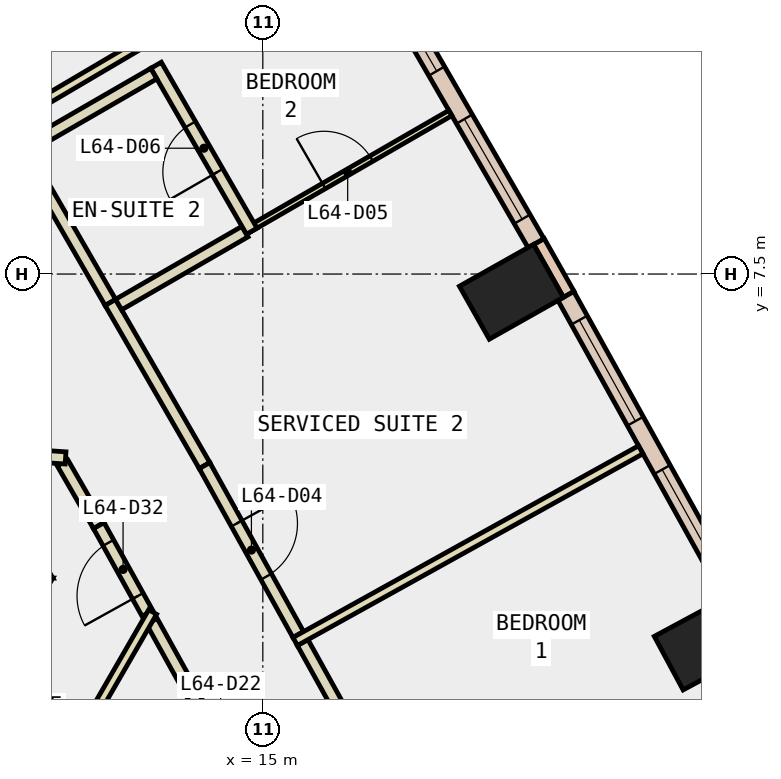
"""IFC4 building model, lengths in metres.
Left out: names, types, materials, properties, quantities, classifications, styles, units other than length and angle.
Written with IfcOpenShell. Run it as: python <this file> out.ifc"""

import sys

from ifc_helpers import new_model, si_unit, direction, frame, frame_2d, origin, origin_2d, place, context, subcontext, project, spatial, polyline, rectangle, outline, extrude, element, fill, save


model = new_model("IFC4")
c1 = context("Model", 3, precision=1e-05, world=origin(), true_north=direction((0.0, 1.0)))
c2 = subcontext(c1, "Body", "Model", "MODEL_VIEW")
j1 = project(units=[si_unit("LENGTHUNIT", "METRE"), si_unit("PLANEANGLEUNIT", "RADIAN")], contexts=[c1])
p1 = place(None, origin())
s1 = spatial("IfcSite", under=j1, at=p1, CompositionType="ELEMENT")
p2 = place(p1, origin())
s2 = spatial("IfcBuilding", under=s1, at=p2, CompositionType="ELEMENT")
p3 = place(p2, frame((0.0, 0.0, 277.4)))
s3 = spatial("IfcBuildingStorey", under=s2, at=p3, CompositionType="ELEMENT", Elevation=277.4)
for number, where, z_axis, x_axis in (
    (1, (22.292, 1.433, -0.34), (0.0, 0.0, 1.0), (-0.474, 0.881, 0.0)),
    (2, (19.089, 7.208, -0.34), (0.0, 0.0, 1.0), (-0.491, 0.871, 0.0)),
):
    element("IfcColumn", number, at=place(p3, frame(where, z_axis=z_axis, x_axis=x_axis)), inside=s3, PredefinedType="COLUMN", context=c2, shape_type="SweptSolid", body=[
        extrude(rectangle(XDim=1.0, YDim=1.4, at=origin_2d()), origin(), (0.0, 0.0, 1.0), 3.34),
    ])
p4 = place(p3, frame((0.0, 0.0, -0.34)))
e3 = element("IfcWall", 3, at=p4, inside=s3, PredefinedType="SHEAR", context=c2, shape_type="SweptSolid", body=[
    extrude(outline(polyline([(6.786, 10.747), (5.833, 10.197), (10.277, 2.5), (11.547, 2.5), (6.786, 10.747)])), origin(), (0.0, 0.0, 1.0), 3.34),
])
p5 = place(p3, frame((0.0, 0.0, -0.34)))
e4 = element("IfcWall", 4, at=p5, inside=s3, PredefinedType="SHEAR", context=c2, shape_type="SweptSolid", body=[
    extrude(outline(polyline([(5.774, -7.5), (11.547, 2.5), (10.277, 2.5), (5.138, -6.4), (5.774, -7.5)])), origin(), (0.0, 0.0, 1.0), 3.34),
])
p6 = place(p3, frame((20.032, 7.165, 0.0), z_axis=(0.0, 0.0, 1.0), x_axis=(-0.491848119507, 0.870681013539, 0.0)))
e5 = element("IfcWall", 5, at=p6, inside=s3, PredefinedType="STANDARD", context=c2, shape_type="SweptSolid", body=[
    extrude(rectangle(XDim=1.0, YDim=0.2, at=frame_2d((0.5, 0.0))), origin(), (0.0, 0.0, 1.0), 3.0),
])
p7 = place(p3, frame((22.71, 2.225, 0.0), z_axis=(0.0, 0.0, 1.0), x_axis=(-0.485049005017, 0.874486971162, 0.0)))
e6 = element("IfcWall", 6, at=p7, inside=s3, PredefinedType="STANDARD", context=c2, shape_type="SweptSolid", body=[
    extrude(rectangle(XDim=5.62, YDim=0.3, at=frame_2d((2.81, 0.0))), origin(), (0.0, 0.0, 1.0), 3.0),
])
p8 = place(p7, frame((0.455, 0.0, 0.9)))
e7 = element("IfcOpeningElement", 7, at=p8, cuts=e6, PredefinedType="OPENING", context=c2, shape_type="SweptSolid", body=[
    extrude(rectangle(XDim=1.9, YDim=2.0, at=frame_2d((0.95, 1.0))), frame((0.0, 0.16, 0.0), z_axis=(0.0, -1.0, 0.0), x_axis=(1.0, 0.0, 0.0)), (0.0, 0.0, 1.0), 0.32),
])
p9 = place(p7, frame((3.265, 0.0, 0.9)))
e8 = element("IfcOpeningElement", 8, at=p9, cuts=e6, PredefinedType="OPENING", context=c2, shape_type="SweptSolid", body=[
    extrude(rectangle(XDim=1.9, YDim=2.0, at=frame_2d((0.95, 1.0))), frame((0.0, 0.16, 0.0), z_axis=(0.0, -1.0, 0.0), x_axis=(1.0, 0.0, 0.0)), (0.0, 0.0, 1.0), 0.32),
])
p10 = place(p3, frame((19.493, 8.008, 0.0), z_axis=(0.0, 0.0, 1.0), x_axis=(-0.49999685976, 0.866027216796, 0.0)))
e9 = element("IfcWall", 9, at=p10, inside=s3, PredefinedType="STANDARD", context=c2, shape_type="SweptSolid", body=[
    extrude(rectangle(XDim=5.622, YDim=0.3, at=frame_2d((2.811, 0.0))), origin(), (0.0, 0.0, 1.0), 3.0),
])
p11 = place(p10, frame((0.456, 0.0, 0.9)))
e10 = element("IfcOpeningElement", 10, at=p11, cuts=e9, PredefinedType="OPENING", context=c2, shape_type="SweptSolid", body=[
    extrude(rectangle(XDim=1.9, YDim=2.0, at=frame_2d((0.95, 1.0))), frame((0.0, 0.16, 0.0), z_axis=(0.0, -1.0, 0.0), x_axis=(1.0, 0.0, 0.0)), (0.0, 0.0, 1.0), 0.32),
])
p12 = place(p10, frame((3.267, 0.0, 0.9)))
e11 = element("IfcOpeningElement", 11, at=p12, cuts=e9, PredefinedType="OPENING", context=c2, shape_type="SweptSolid", body=[
    extrude(rectangle(XDim=1.9, YDim=2.0, at=frame_2d((0.95, 1.0))), frame((0.0, 0.16, 0.0), z_axis=(0.0, -1.0, 0.0), x_axis=(1.0, 0.0, 0.0)), (0.0, 0.0, 1.0), 0.32),
])
p13 = place(p3, frame((13.102, 1.921, 0.0), z_axis=(0.0, 0.0, 1.0), x_axis=(-0.485065409582, 0.874477871891, 0.0)))
e12 = element("IfcWall", 12, at=p13, inside=s3, PredefinedType="PARTITIONING", context=c2, shape_type="SweptSolid", body=[
    extrude(rectangle(XDim=1.651, YDim=0.2, at=frame_2d((0.826, 0.0))), origin(), (0.0, 0.0, 1.0), 3.0),
])
p14 = place(p13, frame((0.325, 0.0, 0.0)))
e13 = element("IfcOpeningElement", 13, at=p14, cuts=e12, PredefinedType="OPENING", context=c2, shape_type="SweptSolid", body=[
    extrude(rectangle(XDim=1.0, YDim=2.1, at=frame_2d((0.5, 1.05))), frame((0.0, 0.11, 0.0), z_axis=(0.0, -1.0, 0.0), x_axis=(1.0, 0.0, 0.0)), (0.0, 0.0, 1.0), 0.22),
])
p15 = place(p3, frame((12.301, 3.365, 0.0), z_axis=(0.0, 0.0, 1.0), x_axis=(-0.499823064078, 0.86612753369, 0.0)))
e14 = element("IfcWall", 14, at=p15, inside=s3, PredefinedType="PARTITIONING", context=c2, shape_type="SweptSolid", body=[
    extrude(rectangle(XDim=1.19, YDim=0.2, at=frame_2d((0.595, 0.0))), origin(), (0.0, 0.0, 1.0), 3.0),
])
p16 = place(p3, frame((11.756, 4.476, 0.0), z_axis=(0.0, 0.0, 1.0), x_axis=(-0.99772020739, 0.067486204256, 0.0)))
e15 = element("IfcWall", 15, at=p16, inside=s3, PredefinedType="PARTITIONING", context=c2, shape_type="SweptSolid", body=[
    extrude(rectangle(XDim=1.407, YDim=0.2, at=frame_2d((0.704, 0.0))), origin(), (0.0, 0.0, 1.0), 3.0),
])
p17 = place(p3, frame((15.439, -2.293, 0.0), z_axis=(0.0, 0.0, 1.0), x_axis=(-0.485079003918, 0.874470331091, 0.0)))
e16 = element("IfcWall", 16, at=p17, inside=s3, PredefinedType="PARTITIONING", context=c2, shape_type="SweptSolid", body=[
    extrude(rectangle(XDim=4.669, YDim=0.2, at=frame_2d((2.334, 0.0))), origin(), (0.0, 0.0, 1.0), 3.0),
])
p18 = place(p17, frame((1.834, 0.0, 0.0)))
e17 = element("IfcOpeningElement", 17, at=p18, cuts=e16, PredefinedType="OPENING", context=c2, shape_type="SweptSolid", body=[
    extrude(rectangle(XDim=1.0, YDim=2.1, at=frame_2d((0.5, 1.05))), frame((0.0, 0.11, 0.0), z_axis=(0.0, -1.0, 0.0), x_axis=(1.0, 0.0, 0.0)), (0.0, 0.0, 1.0), 0.22),
])
p19 = place(p3, frame((15.655, 1.44, 0.0), z_axis=(0.0, 0.0, 1.0), x_axis=(0.485107756493, -0.87445438108, 0.0)))
e18 = element("IfcWall", 18, at=p19, inside=s3, PredefinedType="PARTITIONING", context=c2, shape_type="SweptSolid", body=[
    extrude(rectangle(XDim=3.177, YDim=0.2, at=frame_2d((1.588, 0.0))), origin(), (0.0, 0.0, 1.0), 3.0),
])
p20 = place(p3, frame((12.492, 7.035, 0.0), z_axis=(0.0, 0.0, 1.0), x_axis=(0.49999285859, -0.86602952684, 0.0)))
e19 = element("IfcWall", 19, at=p20, inside=s3, PredefinedType="PARTITIONING", context=c2, shape_type="SweptSolid", body=[
    extrude(rectangle(XDim=3.1, YDim=0.2, at=frame_2d((1.55, 0.0))), origin(), (0.0, 0.0, 1.0), 3.0),
])
p21 = place(p3, frame((14.042, 4.35, 0.0), z_axis=(0.0, 0.0, 1.0), x_axis=(0.484944791944, -0.874544766588, 0.0)))
e20 = element("IfcWall", 20, at=p21, inside=s3, PredefinedType="PARTITIONING", context=c2, shape_type="SweptSolid", body=[
    extrude(rectangle(XDim=3.178, YDim=0.2, at=frame_2d((1.589, 0.0))), origin(), (0.0, 0.0, 1.0), 3.0),
])
p22 = place(p21, frame((1.089, 0.0, 0.0)))
e21 = element("IfcOpeningElement", 21, at=p22, cuts=e20, PredefinedType="OPENING", context=c2, shape_type="SweptSolid", body=[
    extrude(rectangle(XDim=1.0, YDim=2.1, at=frame_2d((0.5, 1.05))), frame((0.0, 0.11, 0.0), z_axis=(0.0, -1.0, 0.0), x_axis=(1.0, 0.0, 0.0)), (0.0, 0.0, 1.0), 0.22),
])
p23 = place(p3, frame((10.992, 9.633, 0.0), z_axis=(0.0, 0.0, 1.0), x_axis=(0.499990139034, -0.866031096941, 0.0)))
e22 = element("IfcWall", 22, at=p23, inside=s3, PredefinedType="PARTITIONING", context=c2, shape_type="SweptSolid", body=[
    extrude(rectangle(XDim=3.0, YDim=0.2, at=frame_2d((1.5, 0.0))), origin(), (0.0, 0.0, 1.0), 3.0),
])
p24 = place(p3, frame((15.532, 1.457, 0.0), z_axis=(0.0, 0.0, 1.0), x_axis=(0.874467143452, 0.485084750351, 0.0)))
e23 = element("IfcWall", 23, at=p24, inside=s3, PredefinedType="PARTITIONING", context=c2, shape_type="SweptSolid", body=[
    extrude(rectangle(XDim=6.5, YDim=0.15, at=frame_2d((3.25, 0.0))), origin(), (0.0, 0.0, 1.0), 3.0),
])
p25 = place(p3, frame((14.707, 8.198, 0.0), z_axis=(0.0, 0.0, 1.0), x_axis=(0.865995823051, 0.500051231833, 0.0)))
e24 = element("IfcWall", 24, at=p25, inside=s3, PredefinedType="PARTITIONING", context=c2, shape_type="SweptSolid", body=[
    extrude(rectangle(XDim=3.899, YDim=0.1, at=frame_2d((1.95, 0.0))), origin(), (0.0, 0.0, 1.0), 3.0),
])
p26 = place(p25, frame((1.5, 0.0, 0.0)))
e25 = element("IfcOpeningElement", 25, at=p26, cuts=e24, PredefinedType="OPENING", context=c2, shape_type="SweptSolid", body=[
    extrude(rectangle(XDim=0.9, YDim=2.1, at=frame_2d((0.45, 1.05))), frame((0.0, 0.06, 0.0), z_axis=(0.0, -1.0, 0.0), x_axis=(1.0, 0.0, 0.0)), (0.0, 0.0, 1.0), 0.12),
])
p27 = place(p3, frame((12.628, 6.998, 0.0), z_axis=(0.0, 0.0, 1.0), x_axis=(0.866100915363, 0.499869187296, 0.0)))
e26 = element("IfcWall", 26, at=p27, inside=s3, PredefinedType="PARTITIONING", context=c2, shape_type="SweptSolid", body=[
    extrude(rectangle(XDim=2.401, YDim=0.2, at=frame_2d((1.2, 0.0))), origin(), (0.0, 0.0, 1.0), 3.0),
])
p28 = place(p3, frame((14.818, 8.205, 0.0), z_axis=(0.0, 0.0, 1.0), x_axis=(-0.499807449307, 0.866136544441, 0.0)))
e27 = element("IfcWall", 27, at=p28, inside=s3, PredefinedType="PARTITIONING", context=c2, shape_type="SweptSolid", body=[
    extrude(rectangle(XDim=3.15, YDim=0.2, at=frame_2d((1.575, 0.0))), origin(), (0.0, 0.0, 1.0), 3.0),
])
p29 = place(p28, frame((1.125, 0.0, 0.0)))
e28 = element("IfcOpeningElement", 28, at=p29, cuts=e27, PredefinedType="OPENING", context=c2, shape_type="SweptSolid", body=[
    extrude(rectangle(XDim=0.9, YDim=2.1, at=frame_2d((0.45, 1.05))), frame((0.0, 0.11, 0.0), z_axis=(0.0, -1.0, 0.0), x_axis=(1.0, 0.0, 0.0)), (0.0, 0.0, 1.0), 0.22),
])
p30 = place(p3, frame((13.207, 10.796, 0.0), z_axis=(0.0, 0.0, 1.0), x_axis=(-0.866022959057, -0.500004234368, 0.0)))
e29 = element("IfcWall", 29, at=p30, inside=s3, PredefinedType="PARTITIONING", context=c2, shape_type="SweptSolid", body=[
    extrude(rectangle(XDim=2.5, YDim=0.2, at=frame_2d((1.25, 0.0))), origin(), (0.0, 0.0, 1.0), 3.0),
])
p31 = place(p3, frame((10.702, 9.934, 0.0), z_axis=(0.0, 0.0, 1.0), x_axis=(0.861684553056, 0.507444313225, 0.0)))
e30 = element("IfcWall", 30, at=p31, inside=s3, PredefinedType="PARTITIONING", context=c2, shape_type="SweptSolid", body=[
    extrude(rectangle(XDim=5.181, YDim=0.15, at=frame_2d((2.59, 0.0))), origin(), (0.0, 0.0, 1.0), 3.0),
])
p32 = place(p3, frame((9.25, -4.879, 0.0), z_axis=(0.0, 0.0, 1.0), x_axis=(0.499999725187, 0.866025562448, 0.0)))
e31 = element("IfcWall", 31, at=p32, inside=s3, PredefinedType="PARTITIONING", context=c2, shape_type="SweptSolid", body=[
    extrude(rectangle(XDim=7.876, YDim=0.15, at=frame_2d((3.938, 0.0))), origin(), (0.0, 0.0, 1.0), 3.0),
])
p33 = place(p8, origin())
e32 = element("IfcWindow", 32, at=p33, inside=s3, PartitioningType="SINGLE_PANEL", PredefinedType="WINDOW", context=c2, shape_type="SweptSolid", body=[
    extrude(rectangle(XDim=1.9, YDim=2.0, at=frame_2d((0.95, 1.0))), frame((0.0, 0.03, 0.0), z_axis=(0.0, -1.0, 0.0), x_axis=(1.0, 0.0, 0.0)), (0.0, 0.0, 1.0), 0.06),
])
fill(e7, e32)
p34 = place(p9, origin())
e33 = element("IfcWindow", 33, at=p34, inside=s3, PartitioningType="SINGLE_PANEL", PredefinedType="WINDOW", context=c2, shape_type="SweptSolid", body=[
    extrude(rectangle(XDim=1.9, YDim=2.0, at=frame_2d((0.95, 1.0))), frame((0.0, 0.03, 0.0), z_axis=(0.0, -1.0, 0.0), x_axis=(1.0, 0.0, 0.0)), (0.0, 0.0, 1.0), 0.06),
])
fill(e8, e33)
p35 = place(p11, origin())
e34 = element("IfcWindow", 34, at=p35, inside=s3, PartitioningType="SINGLE_PANEL", PredefinedType="WINDOW", context=c2, shape_type="SweptSolid", body=[
    extrude(rectangle(XDim=1.9, YDim=2.0, at=frame_2d((0.95, 1.0))), frame((0.0, 0.03, 0.0), z_axis=(0.0, -1.0, 0.0), x_axis=(1.0, 0.0, 0.0)), (0.0, 0.0, 1.0), 0.06),
])
fill(e10, e34)
p36 = place(p12, origin())
e35 = element("IfcWindow", 35, at=p36, inside=s3, PartitioningType="SINGLE_PANEL", PredefinedType="WINDOW", context=c2, shape_type="SweptSolid", body=[
    extrude(rectangle(XDim=1.9, YDim=2.0, at=frame_2d((0.95, 1.0))), frame((0.0, 0.03, 0.0), z_axis=(0.0, -1.0, 0.0), x_axis=(1.0, 0.0, 0.0)), (0.0, 0.0, 1.0), 0.06),
])
fill(e11, e35)
p37 = place(p22, origin())
e36 = element("IfcDoor", 36, at=p37, inside=s3, OperationType="SINGLE_SWING_LEFT", PredefinedType="DOOR", context=c2, shape_type="SweptSolid", body=[
    extrude(rectangle(XDim=1.0, YDim=2.1, at=frame_2d((0.5, 1.05))), frame((0.0, 0.025, 0.0), z_axis=(0.0, -1.0, 0.0), x_axis=(1.0, 0.0, 0.0)), (0.0, 0.0, 1.0), 0.05),
])
fill(e21, e36)
p38 = place(p26, origin())
e37 = element("IfcDoor", 37, at=p38, inside=s3, OperationType="SINGLE_SWING_LEFT", PredefinedType="DOOR", context=c2, shape_type="SweptSolid", body=[
    extrude(rectangle(XDim=0.9, YDim=2.1, at=frame_2d((0.45, 1.05))), frame((0.0, 0.025, 0.0), z_axis=(0.0, -1.0, 0.0), x_axis=(1.0, 0.0, 0.0)), (0.0, 0.0, 1.0), 0.05),
])
fill(e25, e37)
p39 = place(p29, origin())
e38 = element("IfcDoor", 38, at=p39, inside=s3, OperationType="SINGLE_SWING_RIGHT", PredefinedType="DOOR", context=c2, shape_type="SweptSolid", body=[
    extrude(rectangle(XDim=0.9, YDim=2.1, at=frame_2d((0.45, 1.05))), frame((0.0, 0.025, 0.0), z_axis=(0.0, -1.0, 0.0), x_axis=(1.0, 0.0, 0.0)), (0.0, 0.0, 1.0), 0.05),
])
fill(e28, e38)
p40 = place(p14, origin())
e39 = element("IfcDoor", 39, at=p40, inside=s3, OperationType="SINGLE_SWING_RIGHT", PredefinedType="DOOR", context=c2, shape_type="SweptSolid", body=[
    extrude(rectangle(XDim=1.0, YDim=2.1, at=frame_2d((0.5, 1.05))), frame((0.0, 0.025, 0.0), z_axis=(0.0, -1.0, 0.0), x_axis=(1.0, 0.0, 0.0)), (0.0, 0.0, 1.0), 0.05),
])
fill(e13, e39)
save(model, sys.argv[1])
